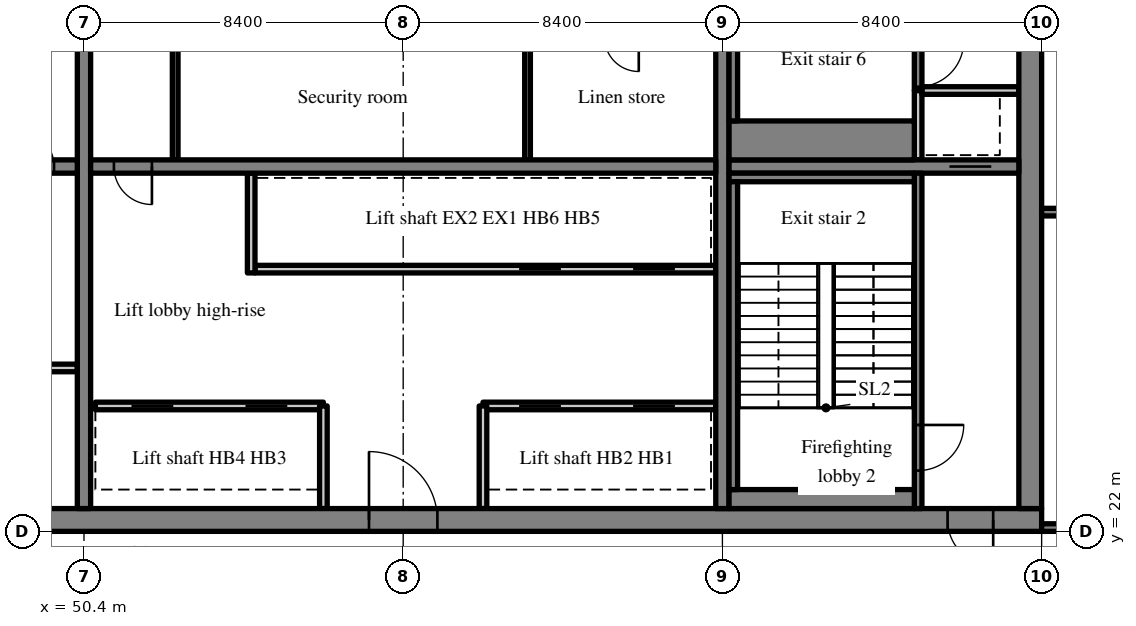
"""IFC4 building model, lengths in metres.
Left out: names, types, materials, properties, quantities, classifications, styles, units other than length and angle.
Written with IfcOpenShell. Run it as: python <this file> out.ifc"""

import sys

from ifc_helpers import new_model, si_unit, direction, frame, frame_2d, origin, place, context, subcontext, project, spatial, rectangle, extrude, source, transform, mapped, element, fill, save


model = new_model("IFC4")
c1 = context("Model", 3, precision=1e-05, world=origin(), true_north=direction((0.0, 1.0)))
c2 = subcontext(c1, "Body", "Model", "MODEL_VIEW")
j1 = project(units=[si_unit("LENGTHUNIT", "METRE"), si_unit("PLANEANGLEUNIT", "RADIAN")], contexts=[c1])
p1 = place(None, origin())
s1 = spatial("IfcSite", under=j1, at=p1, CompositionType="ELEMENT")
p2 = place(p1, origin())
s2 = spatial("IfcBuilding", under=s1, at=p2, CompositionType="ELEMENT")
p3 = place(p2, frame((0.0, 0.0, 245.2)))
s3 = spatial("IfcBuildingStorey", under=s2, at=p3, CompositionType="ELEMENT", Elevation=245.2)
m1 = source(origin(), c2, "Body", "SweptSolid", [
    extrude(rectangle(XDim=50.4, YDim=0.6, at=frame_2d((25.2, 0.0))), origin(), (0.0, 0.0, 1.0), 3.62),
])
p4 = place(p3, frame((25.2, 22.3, 0.0), z_axis=(0.0, 0.0, 1.0), x_axis=(1.0, 0.0, 0.0)))
e1 = element("IfcWall", 1, at=p4, inside=s3, PredefinedType="SHEAR", context=c2, shape_type="MappedRepresentation", body=[
    mapped(m1, transform((0.0, 0.0, 0.0), scale=1.0)),
])
m2 = source(origin(), c2, "Body", "SweptSolid", [
    extrude(rectangle(XDim=1.8, YDim=2.1, at=frame_2d((0.9, 1.05))), frame((0.0, 0.31, 0.0), z_axis=(0.0, -1.0, 0.0), x_axis=(1.0, 0.0, 0.0)), (0.0, 0.0, 1.0), 0.62),
])
p5 = place(p4, frame((15.9, 0.0, 0.0)))
e2 = element("IfcOpeningElement", 2, at=p5, cuts=e1, PredefinedType="OPENING", context=c2, shape_type="MappedRepresentation", body=[
    mapped(m2, transform((0.0, 0.0, 0.0), scale=1.0)),
])
m3 = source(origin(), c2, "Body", "SweptSolid", [
    extrude(rectangle(XDim=0.9, YDim=2.1, at=frame_2d((0.45, 1.05))), frame((0.0, 0.31, 0.0), z_axis=(0.0, -1.0, 0.0), x_axis=(1.0, 0.0, 0.0)), (0.0, 0.0, 1.0), 0.62),
])
p6 = place(p4, frame((9.687, 0.0, 0.0)))
e3 = element("IfcOpeningElement", 3, at=p6, cuts=e1, PredefinedType="OPENING", context=c2, shape_type="MappedRepresentation", body=[
    mapped(m3, transform((0.0, 0.0, 0.0), scale=1.0)),
])
p7 = place(p4, frame((21.513, 0.0, 0.0)))
e4 = element("IfcOpeningElement", 4, at=p7, cuts=e1, PredefinedType="OPENING", context=c2, shape_type="MappedRepresentation", body=[
    mapped(m3, transform((0.0, 0.0, 0.0), scale=1.0)),
])
p8 = place(p4, frame((32.7, 0.0, 0.0)))
e5 = element("IfcOpeningElement", 5, at=p8, cuts=e1, PredefinedType="OPENING", context=c2, shape_type="MappedRepresentation", body=[
    mapped(m2, transform((0.0, 0.0, 0.0), scale=1.0)),
])
m4 = source(origin(), c2, "Body", "SweptSolid", [
    extrude(rectangle(XDim=1.2, YDim=2.1, at=frame_2d((0.6, 1.05))), frame((0.0, 0.31, 0.0), z_axis=(0.0, -1.0, 0.0), x_axis=(1.0, 0.0, 0.0)), (0.0, 0.0, 1.0), 0.62),
])
p9 = place(p4, frame((6.488, 0.0, 0.0)))
e6 = element("IfcOpeningElement", 6, at=p9, cuts=e1, PredefinedType="OPENING", context=c2, shape_type="MappedRepresentation", body=[
    mapped(m4, transform((0.0, 0.0, 0.0), scale=1.0)),
])
p10 = place(p4, frame((47.925, 0.0, 0.0)))
e7 = element("IfcOpeningElement", 7, at=p10, cuts=e1, PredefinedType="OPENING", context=c2, shape_type="MappedRepresentation", body=[
    mapped(m4, transform((0.0, 0.0, 0.0), scale=1.0)),
])
m5 = source(origin(), c2, "Body", "SweptSolid", [
    extrude(rectangle(XDim=18.8, YDim=0.6, at=frame_2d((9.4, 0.0))), origin(), (0.0, 0.0, 1.0), 3.62),
])
p11 = place(p3, frame((75.3, 22.6, 0.0), z_axis=(0.0, 0.0, 1.0), x_axis=(0.0, 1.0, 0.0)))
e8 = element("IfcWall", 8, at=p11, inside=s3, PredefinedType="SHEAR", context=c2, shape_type="MappedRepresentation", body=[
    mapped(m5, transform((0.0, 0.0, 0.0), scale=1.0)),
])
p12 = place(p11, frame((12.8, 0.0, 0.0)))
e9 = element("IfcOpeningElement", 9, at=p12, cuts=e8, PredefinedType="OPENING", context=c2, shape_type="MappedRepresentation", body=[
    mapped(m4, transform((0.0, 0.0, 0.0), scale=1.0)),
])
m6 = source(origin(), c2, "Body", "SweptSolid", [
    extrude(rectangle(XDim=18.8, YDim=0.35, at=frame_2d((9.4, 0.0))), origin(), (0.0, 0.0, 1.0), 3.62),
])
p13 = place(p3, frame((50.4, 22.6, 0.0), z_axis=(0.0, 0.0, 1.0), x_axis=(0.0, 1.0, 0.0)))
e10 = element("IfcWall", 10, at=p13, inside=s3, PredefinedType="SHEAR", context=c2, shape_type="MappedRepresentation", body=[
    mapped(m6, transform((0.0, 0.0, 0.0), scale=1.0)),
])
m7 = source(origin(), c2, "Body", "SweptSolid", [
    extrude(rectangle(XDim=1.1, YDim=2.1, at=frame_2d((0.55, 1.05))), frame((0.0, 0.185, 0.0), z_axis=(0.0, -1.0, 0.0), x_axis=(1.0, 0.0, 0.0)), (0.0, 0.0, 1.0), 0.37),
])
p14 = place(p13, frame((12.85, 0.0, 0.0)))
e11 = element("IfcOpeningElement", 11, at=p14, cuts=e10, PredefinedType="OPENING", context=c2, shape_type="MappedRepresentation", body=[
    mapped(m7, transform((0.0, 0.0, 0.0), scale=1.0)),
])
p15 = place(p3, frame((67.2, 22.6, 0.0), z_axis=(0.0, 0.0, 1.0), x_axis=(0.0, 1.0, 0.0)))
e12 = element("IfcWall", 12, at=p15, inside=s3, PredefinedType="SHEAR", context=c2, shape_type="MappedRepresentation", body=[
    mapped(m6, transform((0.0, 0.0, 0.0), scale=1.0)),
])
m8 = source(origin(), c2, "Body", "SweptSolid", [
    extrude(rectangle(XDim=16.45, YDim=0.35, at=frame_2d((8.225, 0.0))), origin(), (0.0, 0.0, 1.0), 3.62),
])
p16 = place(p3, frame((33.775, 31.6, 0.0), z_axis=(0.0, 0.0, 1.0), x_axis=(1.0, 0.0, 0.0)))
e13 = element("IfcWall", 13, at=p16, inside=s3, PredefinedType="SHEAR", context=c2, shape_type="MappedRepresentation", body=[
    mapped(m8, transform((0.0, 0.0, 0.0), scale=1.0)),
])
m9 = source(origin(), c2, "Body", "SweptSolid", [
    extrude(rectangle(XDim=1.0, YDim=2.1, at=frame_2d((0.5, 1.05))), frame((0.0, 0.185, 0.0), z_axis=(0.0, -1.0, 0.0), x_axis=(1.0, 0.0, 0.0)), (0.0, 0.0, 1.0), 0.37),
])
p17 = place(p16, frame((14.837, 0.0, 0.0)))
e14 = element("IfcOpeningElement", 14, at=p17, cuts=e13, PredefinedType="OPENING", context=c2, shape_type="MappedRepresentation", body=[
    mapped(m9, transform((0.0, 0.0, 0.0), scale=1.0)),
])
m10 = source(origin(), c2, "Body", "SweptSolid", [
    extrude(rectangle(XDim=16.45, YDim=0.35, at=frame_2d((8.225, 0.0))), origin(), (0.0, 0.0, 1.0), 3.62),
])
p18 = place(p3, frame((50.575, 31.6, 0.0), z_axis=(0.0, 0.0, 1.0), x_axis=(1.0, 0.0, 0.0)))
e15 = element("IfcWall", 15, at=p18, inside=s3, PredefinedType="SHEAR", context=c2, shape_type="MappedRepresentation", body=[
    mapped(m10, transform((0.0, 0.0, 0.0), scale=1.0)),
])
p19 = place(p18, frame((0.613, 0.0, 0.0)))
e16 = element("IfcOpeningElement", 16, at=p19, cuts=e15, PredefinedType="OPENING", context=c2, shape_type="MappedRepresentation", body=[
    mapped(m9, transform((0.0, 0.0, 0.0), scale=1.0)),
])
m11 = source(origin(), c2, "Body", "SweptSolid", [
    extrude(rectangle(XDim=7.625, YDim=0.35, at=frame_2d((3.812, 0.0))), origin(), (0.0, 0.0, 1.0), 3.62),
])
p20 = place(p3, frame((67.375, 31.6, 0.0), z_axis=(0.0, 0.0, 1.0), x_axis=(1.0, 0.0, 0.0)))
e17 = element("IfcWall", 17, at=p20, inside=s3, PredefinedType="SHEAR", context=c2, shape_type="MappedRepresentation", body=[
    mapped(m11, transform((0.0, 0.0, 0.0), scale=1.0)),
])
p21 = place(p20, frame((5.8, 0.0, 0.0)))
e18 = element("IfcOpeningElement", 18, at=p21, cuts=e17, PredefinedType="OPENING", context=c2, shape_type="MappedRepresentation", body=[
    mapped(m7, transform((0.0, 0.0, 0.0), scale=1.0)),
])
m12 = source(origin(), c2, "Body", "SweptSolid", [
    extrude(rectangle(XDim=6.125, YDim=0.2, at=frame_2d((3.062, 0.0))), origin(), (0.0, 0.0, 1.0), 3.62),
])
p22 = place(p3, frame((44.1, 26.3, 0.0), z_axis=(0.0, 0.0, 1.0), x_axis=(1.0, 0.0, 0.0)))
e19 = element("IfcWall", 19, at=p22, inside=s3, PredefinedType="PARTITIONING", context=c2, shape_type="MappedRepresentation", body=[
    mapped(m12, transform((0.0, 0.0, 0.0), scale=1.0)),
])
p23 = place(p3, frame((67.025, 25.3, 0.0), z_axis=(0.0, 0.0, 1.0), x_axis=(-1.0, 0.0, 0.0)))
e20 = element("IfcWall", 20, at=p23, inside=s3, PredefinedType="SOLIDWALL", context=c2, shape_type="MappedRepresentation", body=[
    mapped(m12, transform((0.0, 0.0, 0.0), scale=1.0)),
])
m13 = source(origin(), c2, "Body", "SweptSolid", [
    extrude(rectangle(XDim=1.1, YDim=2.1, at=frame_2d((0.55, 1.05))), frame((0.0, 0.11, 0.0), z_axis=(0.0, -1.0, 0.0), x_axis=(1.0, 0.0, 0.0)), (0.0, 0.0, 1.0), 0.22),
])
p24 = place(p23, frame((1.075, 0.0, 0.0)))
e21 = element("IfcOpeningElement", 21, at=p24, cuts=e20, PredefinedType="OPENING", context=c2, shape_type="MappedRepresentation", body=[
    mapped(m13, transform((0.0, 0.0, 0.0), scale=1.0)),
])
p25 = place(p23, frame((4.075, 0.0, 0.0)))
e22 = element("IfcOpeningElement", 22, at=p25, cuts=e20, PredefinedType="OPENING", context=c2, shape_type="MappedRepresentation", body=[
    mapped(m13, transform((0.0, 0.0, 0.0), scale=1.0)),
])
m14 = source(origin(), c2, "Body", "SweptSolid", [
    extrude(rectangle(XDim=6.0, YDim=0.2, at=frame_2d((3.0, 0.0))), origin(), (0.0, 0.0, 1.0), 3.62),
])
p26 = place(p3, frame((56.7, 25.3, 0.0), z_axis=(0.0, 0.0, 1.0), x_axis=(-1.0, 0.0, 0.0)))
e23 = element("IfcWall", 23, at=p26, inside=s3, PredefinedType="SOLIDWALL", context=c2, shape_type="MappedRepresentation", body=[
    mapped(m14, transform((0.0, 0.0, 0.0), scale=1.0)),
])
p27 = place(p26, frame((0.95, 0.0, 0.0)))
e24 = element("IfcOpeningElement", 24, at=p27, cuts=e23, PredefinedType="OPENING", context=c2, shape_type="MappedRepresentation", body=[
    mapped(m13, transform((0.0, 0.0, 0.0), scale=1.0)),
])
p28 = place(p26, frame((3.95, 0.0, 0.0)))
e25 = element("IfcOpeningElement", 25, at=p28, cuts=e23, PredefinedType="OPENING", context=c2, shape_type="MappedRepresentation", body=[
    mapped(m13, transform((0.0, 0.0, 0.0), scale=1.0)),
])
m15 = source(origin(), c2, "Body", "SweptSolid", [
    extrude(rectangle(XDim=12.125, YDim=0.2, at=frame_2d((6.062, 0.0))), origin(), (0.0, 0.0, 1.0), 3.62),
])
p29 = place(p3, frame((67.025, 28.9, 0.0), z_axis=(0.0, 0.0, 1.0), x_axis=(-1.0, 0.0, 0.0)))
e26 = element("IfcWall", 26, at=p29, inside=s3, PredefinedType="SOLIDWALL", context=c2, shape_type="MappedRepresentation", body=[
    mapped(m15, transform((0.0, 0.0, 0.0), scale=1.0)),
])
p30 = place(p29, frame((1.075, 0.0, 0.0)))
e27 = element("IfcOpeningElement", 27, at=p30, cuts=e26, PredefinedType="OPENING", context=c2, shape_type="MappedRepresentation", body=[
    mapped(m13, transform((0.0, 0.0, 0.0), scale=1.0)),
])
p31 = place(p29, frame((4.075, 0.0, 0.0)))
e28 = element("IfcOpeningElement", 28, at=p31, cuts=e26, PredefinedType="OPENING", context=c2, shape_type="MappedRepresentation", body=[
    mapped(m13, transform((0.0, 0.0, 0.0), scale=1.0)),
])
m16 = source(origin(), c2, "Body", "SweptSolid", [
    extrude(rectangle(XDim=2.7, YDim=0.2, at=frame_2d((1.35, 0.0))), origin(), (0.0, 0.0, 1.0), 3.62),
])
for number, where, z_axis, x_axis in (
    (29, (60.9, 22.6, 0.0), (0.0, 0.0, 1.0), (0.0, 1.0, 0.0)),
    (30, (56.7, 22.6, 0.0), (0.0, 0.0, 1.0), (0.0, 1.0, 0.0)),
):
    element("IfcWall", number, at=place(p3, frame(where, z_axis=z_axis, x_axis=x_axis)), inside=s3, PredefinedType="SOLIDWALL", context=c2, shape_type="MappedRepresentation", body=[
        mapped(m16, transform((0.0, 0.0, 0.0), scale=1.0)),
    ])
m17 = source(origin(), c2, "Body", "SweptSolid", [
    extrude(rectangle(XDim=2.625, YDim=0.2, at=frame_2d((1.312, 0.0))), origin(), (0.0, 0.0, 1.0), 3.62),
])
p32 = place(p3, frame((54.8, 28.8, 0.0), z_axis=(0.0, 0.0, 1.0), x_axis=(0.0, 1.0, 0.0)))
e31 = element("IfcWall", 31, at=p32, inside=s3, PredefinedType="SOLIDWALL", context=c2, shape_type="MappedRepresentation", body=[
    mapped(m17, transform((0.0, 0.0, 0.0), scale=1.0)),
])
m18 = source(origin(), c2, "Body", "SweptSolid", [
    extrude(rectangle(XDim=3.225, YDim=0.15, at=frame_2d((1.613, 0.0))), origin(), (0.0, 0.0, 1.0), 3.62),
])
for number, where, z_axis, x_axis in (
    (32, (52.8, 31.775, 0.0), (0.0, 0.0, 1.0), (0.0, 1.0, 0.0)),
    (33, (62.072, 31.775, 0.0), (0.0, 0.0, 1.0), (0.0, 1.0, 0.0)),
):
    element("IfcWall", number, at=place(p3, frame(where, z_axis=z_axis, x_axis=x_axis)), inside=s3, PredefinedType="PARTITIONING", context=c2, shape_type="MappedRepresentation", body=[
        mapped(m18, transform((0.0, 0.0, 0.0), scale=1.0)),
    ])
m19 = source(origin(), c2, "Body", "SweptSolid", [
    extrude(rectangle(XDim=8.825, YDim=0.2, at=frame_2d((4.413, 0.0))), origin(), (0.0, 0.0, 1.0), 3.62),
])
p33 = place(p3, frame((72.35, 22.6, 0.0), z_axis=(0.0, 0.0, 1.0), x_axis=(0.0, 1.0, 0.0)))
e34 = element("IfcWall", 34, at=p33, inside=s3, PredefinedType="SOLIDWALL", context=c2, shape_type="MappedRepresentation", body=[
    mapped(m19, transform((0.0, 0.0, 0.0), scale=1.0)),
])
m20 = source(origin(), c2, "Body", "SweptSolid", [
    extrude(rectangle(XDim=1.2, YDim=2.1, at=frame_2d((0.6, 1.05))), frame((0.0, 0.11, 0.0), z_axis=(0.0, -1.0, 0.0), x_axis=(1.0, 0.0, 0.0)), (0.0, 0.0, 1.0), 0.22),
])
p34 = place(p33, frame((1.0, 0.0, 0.0)))
e35 = element("IfcOpeningElement", 35, at=p34, cuts=e34, PredefinedType="OPENING", context=c2, shape_type="MappedRepresentation", body=[
    mapped(m20, transform((0.0, 0.0, 0.0), scale=1.0)),
])
m21 = source(origin(), c2, "Body", "SweptSolid", [
    extrude(rectangle(XDim=1.825, YDim=0.2, at=frame_2d((0.913, 0.0))), origin(), (0.0, 0.0, 1.0), 3.62),
])
p35 = place(p3, frame((72.35, 31.775, 0.0), z_axis=(0.0, 0.0, 1.0), x_axis=(0.0, 1.0, 0.0)))
e36 = element("IfcWall", 36, at=p35, inside=s3, PredefinedType="SOLIDWALL", context=c2, shape_type="MappedRepresentation", body=[
    mapped(m21, transform((0.0, 0.0, 0.0), scale=1.0)),
])
m22 = source(origin(), c2, "Body", "SweptSolid", [
    extrude(rectangle(XDim=2.55, YDim=0.2, at=frame_2d((1.275, 0.0))), origin(), (0.0, 0.0, 1.0), 3.62),
])
p36 = place(p3, frame((72.45, 33.6, 0.0), z_axis=(0.0, 0.0, 1.0), x_axis=(1.0, 0.0, 0.0)))
e37 = element("IfcWall", 37, at=p36, inside=s3, PredefinedType="SOLIDWALL", context=c2, shape_type="MappedRepresentation", body=[
    mapped(m22, transform((0.0, 0.0, 0.0), scale=1.0)),
])
m23 = source(origin(), c2, "Body", "SweptSolid", [
    extrude(rectangle(XDim=7.8, YDim=0.2, at=frame_2d((3.9, 0.0))), origin(), (0.0, 0.0, 1.0), 3.62),
])
p37 = place(p3, frame((72.35, 33.6, 0.0), z_axis=(0.0, 0.0, 1.0), x_axis=(0.0, 1.0, 0.0)))
e38 = element("IfcWall", 38, at=p37, inside=s3, PredefinedType="SOLIDWALL", context=c2, shape_type="MappedRepresentation", body=[
    mapped(m23, transform((0.0, 0.0, 0.0), scale=1.0)),
])
p38 = place(p37, frame((0.1, 0.0, 0.0)))
e39 = element("IfcOpeningElement", 39, at=p38, cuts=e38, PredefinedType="OPENING", context=c2, shape_type="MappedRepresentation", body=[
    mapped(m20, transform((0.0, 0.0, 0.0), scale=1.0)),
])
m24 = source(origin(), c2, "Body", "SweptSolid", [
    extrude(rectangle(XDim=8.1, YDim=0.2, at=frame_2d((4.05, 0.0))), origin(), (0.0, 0.0, 1.0), 3.62),
])
p39 = place(p3, frame((83.7, 22.1, 0.0), z_axis=(0.0, 0.0, 1.0), x_axis=(-1.0, 0.0, 0.0)))
e40 = element("IfcWall", 40, at=p39, inside=s3, PredefinedType="SOLIDWALL", context=c2, shape_type="MappedRepresentation", body=[
    mapped(m24, transform((0.0, 0.0, 0.0), scale=1.0)),
])
p40 = place(p39, frame((5.9, 0.0, 0.0)))
e41 = element("IfcOpeningElement", 41, at=p40, cuts=e40, PredefinedType="OPENING", context=c2, shape_type="MappedRepresentation", body=[
    mapped(m20, transform((0.0, 0.0, 0.0), scale=1.0)),
])
p41 = place(p3, frame((83.7, 30.4, 0.0), z_axis=(0.0, 0.0, 1.0), x_axis=(-1.0, 0.0, 0.0)))
e42 = element("IfcWall", 42, at=p41, inside=s3, PredefinedType="SOLIDWALL", context=c2, shape_type="MappedRepresentation", body=[
    mapped(m24, transform((0.0, 0.0, 0.0), scale=1.0)),
])
m25 = source(origin(), c2, "Body", "SweptSolid", [
    extrude(rectangle(XDim=1.0, YDim=2.1, at=frame_2d((0.5, 1.05))), frame((0.0, 0.11, 0.0), z_axis=(0.0, -1.0, 0.0), x_axis=(1.0, 0.0, 0.0)), (0.0, 0.0, 1.0), 0.22),
])
p42 = place(p41, frame((6.0, 0.0, 0.0)))
e43 = element("IfcOpeningElement", 43, at=p42, cuts=e42, PredefinedType="OPENING", context=c2, shape_type="MappedRepresentation", body=[
    mapped(m25, transform((0.0, 0.0, 0.0), scale=1.0)),
])
m26 = source(origin(), c2, "Body", "SweptSolid", [
    extrude(rectangle(XDim=4.875, YDim=0.5, at=frame_2d((2.438, 0.0))), origin(), (0.0, 0.0, 1.0), 3.62),
])
p43 = place(p3, frame((67.375, 22.85, 0.0), z_axis=(0.0, 0.0, 1.0), x_axis=(1.0, 0.0, 0.0)))
e44 = element("IfcWall", 44, at=p43, inside=s3, PredefinedType="SOLIDWALL", context=c2, shape_type="MappedRepresentation", body=[
    mapped(m26, transform((0.0, 0.0, 0.0), scale=1.0)),
])
m27 = source(origin(), c2, "Body", "SweptSolid", [
    extrude(rectangle(XDim=4.875, YDim=0.225, at=frame_2d((2.438, 0.0))), origin(), (0.0, 0.0, 1.0), 3.62),
])
p44 = place(p3, frame((67.375, 31.312, 0.0), z_axis=(0.0, 0.0, 1.0), x_axis=(1.0, 0.0, 0.0)))
e45 = element("IfcWall", 45, at=p44, inside=s3, PredefinedType="SOLIDWALL", context=c2, shape_type="MappedRepresentation", body=[
    mapped(m27, transform((0.0, 0.0, 0.0), scale=1.0)),
])
m28 = source(origin(), c2, "Body", "SweptSolid", [
    extrude(rectangle(XDim=8.1, YDim=0.225, at=frame_2d((4.05, 0.0))), origin(), (0.0, 0.0, 1.0), 3.62),
])
p45 = place(p3, frame((67.487, 23.1, 0.0), z_axis=(0.0, 0.0, 1.0), x_axis=(0.0, 1.0, 0.0)))
e46 = element("IfcWall", 46, at=p45, inside=s3, PredefinedType="SOLIDWALL", context=c2, shape_type="MappedRepresentation", body=[
    mapped(m28, transform((0.0, 0.0, 0.0), scale=1.0)),
])
m29 = source(origin(), c2, "Body", "SweptSolid", [
    extrude(rectangle(XDim=4.875, YDim=1.025, at=frame_2d((2.438, 0.0))), origin(), (0.0, 0.0, 1.0), 3.62),
])
p46 = place(p3, frame((67.375, 32.287, 0.0), z_axis=(0.0, 0.0, 1.0), x_axis=(1.0, 0.0, 0.0)))
e47 = element("IfcWall", 47, at=p46, inside=s3, PredefinedType="SOLIDWALL", context=c2, shape_type="MappedRepresentation", body=[
    mapped(m29, transform((0.0, 0.0, 0.0), scale=1.0)),
])
p47 = place(p3, frame((67.487, 32.8, 0.0), z_axis=(0.0, 0.0, 1.0), x_axis=(0.0, 1.0, 0.0)))
e48 = element("IfcWall", 48, at=p47, inside=s3, PredefinedType="SOLIDWALL", context=c2, shape_type="MappedRepresentation", body=[
    mapped(m28, transform((0.0, 0.0, 0.0), scale=1.0)),
])
m30 = source(origin(), c2, "Body", "SweptSolid", [
    extrude(rectangle(XDim=1.0, YDim=2.1, at=frame_2d((0.5, 1.05))), frame((0.0, 0.025, 0.0), z_axis=(0.0, -1.0, 0.0), x_axis=(1.0, 0.0, 0.0)), (0.0, 0.0, 1.0), 0.05),
])
p48 = place(p17, origin())
e49 = element("IfcDoor", 49, at=p48, inside=s3, OperationType="SINGLE_SWING_LEFT", PredefinedType="DOOR", context=c2, shape_type="MappedRepresentation", body=[
    mapped(m30, transform((0.0, 0.0, 0.0), scale=1.0)),
])
fill(e14, e49)
m31 = source(origin(), c2, "Body", "SweptSolid", [
    extrude(rectangle(XDim=1.8, YDim=2.1, at=frame_2d((0.9, 1.05))), frame((0.0, 0.225, 0.0), z_axis=(0.0, -1.0, 0.0), x_axis=(1.0, 0.0, 0.0)), (0.0, 0.0, 1.0), 0.05),
])
p49 = place(p8, origin())
e50 = element("IfcDoor", 50, at=p49, inside=s3, OperationType="DOUBLE_DOOR_SINGLE_SWING", PredefinedType="DOOR", context=c2, shape_type="MappedRepresentation", body=[
    mapped(m31, transform((0.0, 0.0, 0.0), scale=1.0)),
])
fill(e5, e50)
p50 = place(p19, origin())
e51 = element("IfcDoor", 51, at=p50, inside=s3, OperationType="SINGLE_SWING_RIGHT", PredefinedType="DOOR", context=c2, shape_type="MappedRepresentation", body=[
    mapped(m30, transform((0.0, 0.0, 0.0), scale=1.0)),
])
fill(e16, e51)
m32 = source(origin(), c2, "Body", "SweptSolid", [
    extrude(rectangle(XDim=1.1, YDim=2.1, at=frame_2d((0.55, 1.05))), frame((0.0, 0.025, 0.0), z_axis=(0.0, -1.0, 0.0), x_axis=(1.0, 0.0, 0.0)), (0.0, 0.0, 1.0), 0.05),
])
p51 = place(p24, origin())
e52 = element("IfcDoor", 52, at=p51, inside=s3, OperationType="SLIDING_TO_RIGHT", PredefinedType="DOOR", context=c2, shape_type="MappedRepresentation", body=[
    mapped(m32, transform((0.0, 0.0, 0.0), scale=1.0)),
])
fill(e21, e52)
p52 = place(p25, origin())
e53 = element("IfcDoor", 53, at=p52, inside=s3, OperationType="SLIDING_TO_LEFT", PredefinedType="DOOR", context=c2, shape_type="MappedRepresentation", body=[
    mapped(m32, transform((0.0, 0.0, 0.0), scale=1.0)),
])
fill(e22, e53)
p53 = place(p27, origin())
e54 = element("IfcDoor", 54, at=p53, inside=s3, OperationType="SLIDING_TO_RIGHT", PredefinedType="DOOR", context=c2, shape_type="MappedRepresentation", body=[
    mapped(m32, transform((0.0, 0.0, 0.0), scale=1.0)),
])
fill(e24, e54)
p54 = place(p28, origin())
e55 = element("IfcDoor", 55, at=p54, inside=s3, OperationType="SLIDING_TO_LEFT", PredefinedType="DOOR", context=c2, shape_type="MappedRepresentation", body=[
    mapped(m32, transform((0.0, 0.0, 0.0), scale=1.0)),
])
fill(e25, e55)
p55 = place(p30, origin())
e56 = element("IfcDoor", 56, at=p55, inside=s3, OperationType="SLIDING_TO_RIGHT", PredefinedType="DOOR", context=c2, shape_type="MappedRepresentation", body=[
    mapped(m32, transform((0.0, 0.0, 0.0), scale=1.0)),
])
fill(e27, e56)
p56 = place(p31, origin())
e57 = element("IfcDoor", 57, at=p56, inside=s3, OperationType="SLIDING_TO_LEFT", PredefinedType="DOOR", context=c2, shape_type="MappedRepresentation", body=[
    mapped(m32, transform((0.0, 0.0, 0.0), scale=1.0)),
])
fill(e28, e57)
m33 = source(origin(), c2, "Body", "SweptSolid", [
    extrude(rectangle(XDim=1.2, YDim=2.1, at=frame_2d((0.6, 1.05))), frame((0.0, 0.025, 0.0), z_axis=(0.0, -1.0, 0.0), x_axis=(1.0, 0.0, 0.0)), (0.0, 0.0, 1.0), 0.05),
])
p57 = place(p34, origin())
e58 = element("IfcDoor", 58, at=p57, inside=s3, OperationType="SINGLE_SWING_RIGHT", PredefinedType="DOOR", context=c2, shape_type="MappedRepresentation", body=[
    mapped(m33, transform((0.0, 0.0, 0.0), scale=1.0)),
])
fill(e35, e58)
m34 = source(origin(), c2, "Body", "SweptSolid", [
    extrude(rectangle(XDim=1.2, YDim=2.1, at=frame_2d((0.6, 1.05))), frame((0.0, 0.225, 0.0), z_axis=(0.0, -1.0, 0.0), x_axis=(1.0, 0.0, 0.0)), (0.0, 0.0, 1.0), 0.05),
])
p58 = place(p10, origin())
e59 = element("IfcDoor", 59, at=p58, inside=s3, OperationType="SINGLE_SWING_RIGHT", PredefinedType="DOOR", context=c2, shape_type="MappedRepresentation", body=[
    mapped(m34, transform((0.0, 0.0, 0.0), scale=1.0)),
])
fill(e7, e59)
p59 = place(p21, origin())
e60 = element("IfcDoor", 60, at=p59, inside=s3, OperationType="SLIDING_TO_RIGHT", PredefinedType="DOOR", context=c2, shape_type="MappedRepresentation", body=[
    mapped(m32, transform((0.0, 0.0, 0.0), scale=1.0)),
])
fill(e18, e60)
p60 = place(p38, origin())
e61 = element("IfcDoor", 61, at=p60, inside=s3, OperationType="SINGLE_SWING_RIGHT", PredefinedType="DOOR", context=c2, shape_type="MappedRepresentation", body=[
    mapped(m33, transform((0.0, 0.0, 0.0), scale=1.0)),
])
fill(e39, e61)
save(model, sys.argv[1])
